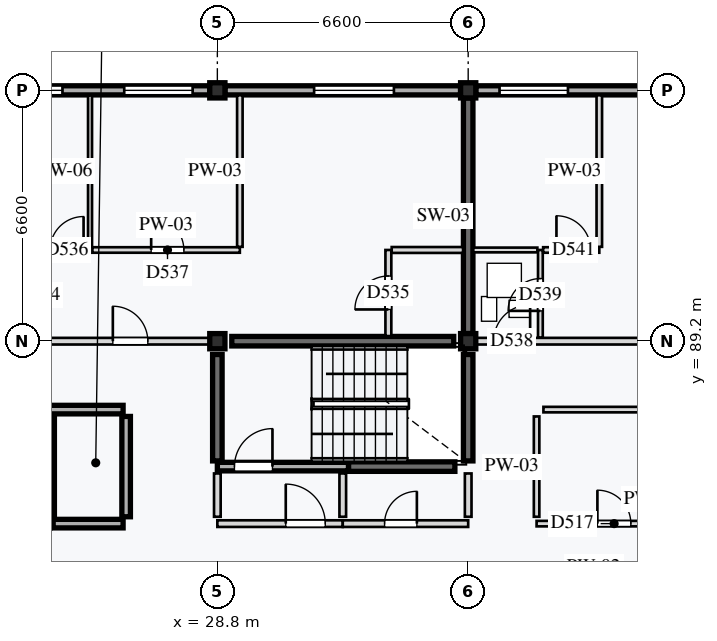
"""IFC4 building model, lengths in metres.
Left out: names, types, materials, properties, quantities, classifications, styles, units other than length and angle.
Written with IfcOpenShell. Run it as: python <this file> out.ifc"""

import sys

from ifc_helpers import new_model, si_unit, direction, frame, frame_2d, origin, origin_2d, place, context, subcontext, project, spatial, rectangle, extrude, element, fill, save


model = new_model("IFC4")
c1 = context("Model", 3, precision=1e-05, world=origin(), true_north=direction((0.0, 1.0)))
c2 = subcontext(c1, "Body", "Model", "MODEL_VIEW")
j1 = project(units=[si_unit("LENGTHUNIT", "METRE"), si_unit("PLANEANGLEUNIT", "RADIAN")], contexts=[c1])
p1 = place(None, origin())
s1 = spatial("IfcSite", under=j1, at=p1, CompositionType="ELEMENT")
p2 = place(p1, origin())
s2 = spatial("IfcBuilding", under=s1, at=p2, CompositionType="ELEMENT")
p3 = place(p2, frame((0.0, 0.0, 53.2)))
s3 = spatial("IfcBuildingStorey", under=s2, at=p3, CompositionType="ELEMENT", Elevation=53.2)
for number, where, z_axis, x_axis in (
    (1, (28.8, 89.2, 0.0), (0.0, 0.0, 1.0), (1.0, 0.0, 0.0)),
    (2, (28.8, 95.8, 0.0), (0.0, 0.0, 1.0), (1.0, 0.0, 0.0)),
    (3, (35.4, 89.2, 0.0), (0.0, 0.0, 1.0), (1.0, 0.0, 0.0)),
    (4, (35.4, 95.8, 0.0), (0.0, 0.0, 1.0), (1.0, 0.0, 0.0)),
):
    element("IfcColumn", number, at=place(p3, frame(where, z_axis=z_axis, x_axis=x_axis)), inside=s3, PredefinedType="COLUMN", context=c2, shape_type="SweptSolid", body=[
        extrude(rectangle(XDim=0.4, YDim=0.4, at=origin_2d()), origin(), (0.0, 0.0, 1.0), 3.2),
    ])
p4 = place(p3, frame((29.18, 89.2, 0.0), z_axis=(0.0, 0.0, 1.0), x_axis=(1.0, 0.0, 0.0)))
e5 = element("IfcWall", 5, at=p4, inside=s3, PredefinedType="SHEAR", context=c2, shape_type="SweptSolid", body=[
    extrude(rectangle(XDim=5.84, YDim=0.25, at=frame_2d((2.92, 0.0))), origin(), (0.0, 0.0, 1.0), 2.98),
])
for number, where, z_axis, x_axis in (
    (6, (32.25, 85.9, 0.0), (0.0, 0.0, 1.0), (1.0, 0.0, 0.0)),
    (7, (28.8, 86.05, 0.0), (0.0, 0.0, 1.0), (0.0, 1.0, 0.0)),
    (8, (35.4, 86.05, 0.0), (0.0, 0.0, 1.0), (0.0, 1.0, 0.0)),
):
    element("IfcWall", number, at=place(p3, frame(where, z_axis=z_axis, x_axis=x_axis)), inside=s3, PredefinedType="SHEAR", context=c2, shape_type="SweptSolid", body=[
        extrude(rectangle(XDim=2.8, YDim=0.25, at=frame_2d((1.4, 0.0))), origin(), (0.0, 0.0, 1.0), 2.98),
    ])
p5 = place(p3, frame((35.4, 89.4, 0.0), z_axis=(0.0, 0.0, 1.0), x_axis=(0.0, 1.0, 0.0)))
e9 = element("IfcWall", 9, at=p5, inside=s3, PredefinedType="SHEAR", context=c2, shape_type="SweptSolid", body=[
    extrude(rectangle(XDim=6.2, YDim=0.25, at=frame_2d((3.1, 0.0))), origin(), (0.0, 0.0, 1.0), 2.98),
])
p6 = place(p3, frame((22.4, 95.8, 0.0), z_axis=(0.0, 0.0, 1.0), x_axis=(1.0, 0.0, 0.0)))
e10 = element("IfcWall", 10, at=p6, inside=s3, PredefinedType="STANDARD", context=c2, shape_type="SweptSolid", body=[
    extrude(rectangle(XDim=6.2, YDim=0.24, at=frame_2d((3.1, 0.0))), origin(), (0.0, 0.0, 1.0), 2.6),
])
p7 = place(p6, frame((0.525, 0.0, 0.85)))
e11 = element("IfcOpeningElement", 11, at=p7, cuts=e10, PredefinedType="OPENING", context=c2, shape_type="SweptSolid", body=[
    extrude(rectangle(XDim=1.8, YDim=1.35, at=frame_2d((0.9, 0.675))), frame((0.0, 0.13, 0.0), z_axis=(0.0, -1.0, 0.0), x_axis=(1.0, 0.0, 0.0)), (0.0, 0.0, 1.0), 0.26),
])
p8 = place(p6, frame((3.95, 0.0, 0.85)))
e12 = element("IfcOpeningElement", 12, at=p8, cuts=e10, PredefinedType="OPENING", context=c2, shape_type="SweptSolid", body=[
    extrude(rectangle(XDim=1.8, YDim=1.35, at=frame_2d((0.9, 0.675))), frame((0.0, 0.13, 0.0), z_axis=(0.0, -1.0, 0.0), x_axis=(1.0, 0.0, 0.0)), (0.0, 0.0, 1.0), 0.26),
])
p9 = place(p3, frame((29.0, 95.8, 0.0), z_axis=(0.0, 0.0, 1.0), x_axis=(1.0, 0.0, 0.0)))
e13 = element("IfcWall", 13, at=p9, inside=s3, PredefinedType="STANDARD", context=c2, shape_type="SweptSolid", body=[
    extrude(rectangle(XDim=6.2, YDim=0.24, at=frame_2d((3.1, 0.0))), origin(), (0.0, 0.0, 1.0), 2.6),
])
p10 = place(p9, frame((2.346, 0.0, 0.85)))
e14 = element("IfcOpeningElement", 14, at=p10, cuts=e13, PredefinedType="OPENING", context=c2, shape_type="SweptSolid", body=[
    extrude(rectangle(XDim=2.1, YDim=1.55, at=frame_2d((1.05, 0.775))), frame((0.0, 0.13, 0.0), z_axis=(0.0, -1.0, 0.0), x_axis=(1.0, 0.0, 0.0)), (0.0, 0.0, 1.0), 0.26),
])
p11 = place(p3, frame((35.6, 95.8, 0.0), z_axis=(0.0, 0.0, 1.0), x_axis=(1.0, 0.0, 0.0)))
e15 = element("IfcWall", 15, at=p11, inside=s3, PredefinedType="STANDARD", context=c2, shape_type="SweptSolid", body=[
    extrude(rectangle(XDim=6.2, YDim=0.24, at=frame_2d((3.1, 0.0))), origin(), (0.0, 0.0, 1.0), 2.6),
])
p12 = place(p11, frame((0.625, 0.0, 0.85)))
e16 = element("IfcOpeningElement", 16, at=p12, cuts=e15, PredefinedType="OPENING", context=c2, shape_type="SweptSolid", body=[
    extrude(rectangle(XDim=1.8, YDim=1.35, at=frame_2d((0.9, 0.675))), frame((0.0, 0.13, 0.0), z_axis=(0.0, -1.0, 0.0), x_axis=(1.0, 0.0, 0.0)), (0.0, 0.0, 1.0), 0.26),
])
p13 = place(p3, frame((24.48, 84.4, 0.0), z_axis=(0.0, 0.0, 1.0), x_axis=(1.0, 0.0, 0.0)))
e17 = element("IfcWall", 17, at=p13, inside=s3, PredefinedType="STANDARD", context=c2, shape_type="SweptSolid", body=[
    extrude(rectangle(XDim=1.84, YDim=0.225, at=frame_2d((0.92, 0.0))), origin(), (0.0, 0.0, 1.0), 2.945),
])
p14 = place(p3, frame((22.298, 87.4, 0.0), z_axis=(0.0, 0.0, 1.0), x_axis=(1.0, 0.0, 0.0)))
e18 = element("IfcWall", 18, at=p14, inside=s3, PredefinedType="STANDARD", context=c2, shape_type="SweptSolid", body=[
    extrude(rectangle(XDim=4.022, YDim=0.225, at=frame_2d((2.011, 0.0))), origin(), (0.0, 0.0, 1.0), 2.945),
])
for number, where, z_axis, x_axis in (
    (19, (24.4, 84.58, 0.0), (0.0, 0.0, 1.0), (0.0, 1.0, 0.0)),
    (20, (26.4, 84.58, 0.0), (0.0, 0.0, 1.0), (0.0, 1.0, 0.0)),
):
    element("IfcWall", number, at=place(p3, frame(where, z_axis=z_axis, x_axis=x_axis)), inside=s3, PredefinedType="STANDARD", context=c2, shape_type="SweptSolid", body=[
        extrude(rectangle(XDim=2.64, YDim=0.225, at=frame_2d((1.32, 0.0))), origin(), (0.0, 0.0, 1.0), 2.945),
    ])
p15 = place(p3, frame((28.8, 85.9, 0.0), z_axis=(0.0, 0.0, 1.0), x_axis=(1.0, 0.0, 0.0)))
e21 = element("IfcWall", 21, at=p15, inside=s3, PredefinedType="STANDARD", context=c2, shape_type="SweptSolid", body=[
    extrude(rectangle(XDim=3.45, YDim=0.225, at=frame_2d((1.725, 0.0))), origin(), (0.0, 0.0, 1.0), 2.945),
])
p16 = place(p15, frame((0.45, 0.0, 0.0)))
e22 = element("IfcOpeningElement", 22, at=p16, cuts=e21, PredefinedType="OPENING", context=c2, shape_type="SweptSolid", body=[
    extrude(rectangle(XDim=1.0, YDim=2.16, at=frame_2d((0.5, 1.08))), frame((0.0, 0.123, 0.0), z_axis=(0.0, -1.0, 0.0), x_axis=(1.0, 0.0, 0.0)), (0.0, 0.0, 1.0), 0.245),
])
p17 = place(p3, frame((28.8, 84.4, 0.0), z_axis=(0.0, 0.0, 1.0), x_axis=(1.0, 0.0, 0.0)))
e23 = element("IfcWall", 23, at=p17, inside=s3, PredefinedType="PARTITIONING", context=c2, shape_type="SweptSolid", body=[
    extrude(rectangle(XDim=3.3, YDim=0.175, at=frame_2d((1.65, 0.0))), origin(), (0.0, 0.0, 1.0), 2.945),
])
p18 = place(p17, frame((1.8, 0.0, 0.0)))
e24 = element("IfcOpeningElement", 24, at=p18, cuts=e23, PredefinedType="OPENING", context=c2, shape_type="SweptSolid", body=[
    extrude(rectangle(XDim=1.04, YDim=2.12, at=frame_2d((0.52, 1.06))), frame((0.0, 0.097, 0.0), z_axis=(0.0, -1.0, 0.0), x_axis=(1.0, 0.0, 0.0)), (0.0, 0.0, 1.0), 0.195),
])
p19 = place(p3, frame((32.1, 84.4, 0.0), z_axis=(0.0, 0.0, 1.0), x_axis=(1.0, 0.0, 0.0)))
e25 = element("IfcWall", 25, at=p19, inside=s3, PredefinedType="PARTITIONING", context=c2, shape_type="SweptSolid", body=[
    extrude(rectangle(XDim=3.3, YDim=0.175, at=frame_2d((1.65, 0.0))), origin(), (0.0, 0.0, 1.0), 2.945),
])
p20 = place(p19, frame((1.1, 0.0, 0.0)))
e26 = element("IfcOpeningElement", 26, at=p20, cuts=e25, PredefinedType="OPENING", context=c2, shape_type="SweptSolid", body=[
    extrude(rectangle(XDim=0.85, YDim=2.0, at=frame_2d((0.425, 1.0))), frame((0.0, 0.097, 0.0), z_axis=(0.0, -1.0, 0.0), x_axis=(1.0, 0.0, 0.0)), (0.0, 0.0, 1.0), 0.195),
])
for number, where, z_axis, x_axis in (
    (27, (28.8, 84.58, 0.0), (0.0, 0.0, 1.0), (0.0, 1.0, 0.0)),
    (28, (32.1, 84.58, 0.0), (0.0, 0.0, 1.0), (0.0, 1.0, 0.0)),
    (29, (35.4, 84.58, 0.0), (0.0, 0.0, 1.0), (0.0, 1.0, 0.0)),
):
    element("IfcWall", number, at=place(p3, frame(where, z_axis=z_axis, x_axis=x_axis)), inside=s3, PredefinedType="PARTITIONING", context=c2, shape_type="SweptSolid", body=[
        extrude(rectangle(XDim=1.14, YDim=0.175, at=frame_2d((0.57, 0.0))), origin(), (0.0, 0.0, 1.0), 2.945),
    ])
p21 = place(p3, frame((37.2, 84.4, 0.0), z_axis=(0.0, 0.0, 1.0), x_axis=(1.0, 0.0, 0.0)))
e30 = element("IfcWall", 30, at=p21, inside=s3, PredefinedType="PARTITIONING", context=c2, shape_type="SweptSolid", body=[
    extrude(rectangle(XDim=6.0, YDim=0.145, at=frame_2d((3.0, 0.0))), origin(), (0.0, 0.0, 1.0), 2.945),
])
p22 = place(p21, frame((1.6, 0.0, 0.0)))
e31 = element("IfcOpeningElement", 31, at=p22, cuts=e30, PredefinedType="OPENING", context=c2, shape_type="SweptSolid", body=[
    extrude(rectangle(XDim=0.88, YDim=2.1, at=frame_2d((0.44, 1.05))), frame((0.0, 0.083, 0.0), z_axis=(0.0, -1.0, 0.0), x_axis=(1.0, 0.0, 0.0)), (0.0, 0.0, 1.0), 0.165),
])
p23 = place(p3, frame((37.38, 87.4, 0.0), z_axis=(0.0, 0.0, 1.0), x_axis=(1.0, 0.0, 0.0)))
e32 = element("IfcWall", 32, at=p23, inside=s3, PredefinedType="PARTITIONING", context=c2, shape_type="SweptSolid", body=[
    extrude(rectangle(XDim=11.2, YDim=0.145, at=frame_2d((5.6, 0.0))), origin(), (0.0, 0.0, 1.0), 2.945),
])
p24 = place(p3, frame((37.2, 84.58, 0.0), z_axis=(0.0, 0.0, 1.0), x_axis=(0.0, 1.0, 0.0)))
e33 = element("IfcWall", 33, at=p24, inside=s3, PredefinedType="PARTITIONING", context=c2, shape_type="SweptSolid", body=[
    extrude(rectangle(XDim=2.64, YDim=0.145, at=frame_2d((1.32, 0.0))), origin(), (0.0, 0.0, 1.0), 2.945),
])
p25 = place(p3, frame((22.2, 89.2, 0.0), z_axis=(0.0, 0.0, 1.0), x_axis=(1.0, 0.0, 0.0)))
e34 = element("IfcWall", 34, at=p25, inside=s3, PredefinedType="PARTITIONING", context=c2, shape_type="SweptSolid", body=[
    extrude(rectangle(XDim=6.6, YDim=0.175, at=frame_2d((3.3, 0.0))), origin(), (0.0, 0.0, 1.0), 2.7),
])
p26 = place(p25, frame((3.85, 0.0, 0.0)))
e35 = element("IfcOpeningElement", 35, at=p26, cuts=e34, PredefinedType="OPENING", context=c2, shape_type="SweptSolid", body=[
    extrude(rectangle(XDim=0.92, YDim=2.14, at=frame_2d((0.46, 1.07))), frame((0.0, 0.097, 0.0), z_axis=(0.0, -1.0, 0.0), x_axis=(1.0, 0.0, 0.0)), (0.0, 0.0, 1.0), 0.195),
])
p27 = place(p3, frame((33.3, 89.335, 0.0), z_axis=(0.0, 0.0, 1.0), x_axis=(0.0, 1.0, 0.0)))
e36 = element("IfcWall", 36, at=p27, inside=s3, PredefinedType="PARTITIONING", context=c2, shape_type="SweptSolid", body=[
    extrude(rectangle(XDim=2.265, YDim=0.155, at=frame_2d((1.133, 0.0))), origin(), (0.0, 0.0, 1.0), 2.945),
])
p28 = place(p27, frame((0.7, 0.0, 0.0)))
e37 = element("IfcOpeningElement", 37, at=p28, cuts=e36, PredefinedType="OPENING", context=c2, shape_type="SweptSolid", body=[
    extrude(rectangle(XDim=0.88, YDim=2.1, at=frame_2d((0.44, 1.05))), frame((0.0, 0.087, 0.0), z_axis=(0.0, -1.0, 0.0), x_axis=(1.0, 0.0, 0.0)), (0.0, 0.0, 1.0), 0.175),
])
p29 = place(p3, frame((33.387, 91.6, 0.0), z_axis=(0.0, 0.0, 1.0), x_axis=(1.0, 0.0, 0.0)))
e38 = element("IfcWall", 38, at=p29, inside=s3, PredefinedType="PARTITIONING", context=c2, shape_type="SweptSolid", body=[
    extrude(rectangle(XDim=1.877, YDim=0.155, at=frame_2d((0.939, 0.0))), origin(), (0.0, 0.0, 1.0), 2.945),
])
p30 = place(p3, frame((24.173, 91.6, 0.0), z_axis=(0.0, 0.0, 1.0), x_axis=(1.0, 0.0, 0.0)))
e39 = element("IfcWall", 39, at=p30, inside=s3, PredefinedType="PARTITIONING", context=c2, shape_type="SweptSolid", body=[
    extrude(rectangle(XDim=1.277, YDim=0.145, at=frame_2d((0.639, 0.0))), origin(), (0.0, 0.0, 1.0), 2.945),
])
p31 = place(p30, frame((0.228, 0.0, 0.0)))
e40 = element("IfcOpeningElement", 40, at=p31, cuts=e39, PredefinedType="OPENING", context=c2, shape_type="SweptSolid", body=[
    extrude(rectangle(XDim=0.88, YDim=2.16, at=frame_2d((0.44, 1.08))), frame((0.0, 0.083, 0.0), z_axis=(0.0, -1.0, 0.0), x_axis=(1.0, 0.0, 0.0)), (0.0, 0.0, 1.0), 0.165),
])
p32 = place(p3, frame((25.45, 91.683, 0.0), z_axis=(0.0, 0.0, 1.0), x_axis=(0.0, 1.0, 0.0)))
e41 = element("IfcWall", 41, at=p32, inside=s3, PredefinedType="PARTITIONING", context=c2, shape_type="SweptSolid", body=[
    extrude(rectangle(XDim=3.987, YDim=0.105, at=frame_2d((1.994, 0.0))), origin(), (0.0, 0.0, 1.0), 2.945),
])
p33 = place(p3, frame((25.512, 91.6, 0.0), z_axis=(0.0, 0.0, 1.0), x_axis=(1.0, 0.0, 0.0)))
e42 = element("IfcWall", 42, at=p33, inside=s3, PredefinedType="PARTITIONING", context=c2, shape_type="SweptSolid", body=[
    extrude(rectangle(XDim=3.88, YDim=0.145, at=frame_2d((1.94, 0.0))), origin(), (0.0, 0.0, 1.0), 2.945),
])
p34 = place(p33, frame((1.546, 0.0, 0.0)))
e43 = element("IfcOpeningElement", 43, at=p34, cuts=e42, PredefinedType="OPENING", context=c2, shape_type="SweptSolid", body=[
    extrude(rectangle(XDim=0.86, YDim=2.12, at=frame_2d((0.43, 1.06))), frame((0.0, 0.083, 0.0), z_axis=(0.0, -1.0, 0.0), x_axis=(1.0, 0.0, 0.0)), (0.0, 0.0, 1.0), 0.165),
])
p35 = place(p3, frame((29.392, 91.683, 0.0), z_axis=(0.0, 0.0, 1.0), x_axis=(0.0, 1.0, 0.0)))
e44 = element("IfcWall", 44, at=p35, inside=s3, PredefinedType="PARTITIONING", context=c2, shape_type="SweptSolid", body=[
    extrude(rectangle(XDim=3.987, YDim=0.145, at=frame_2d((1.994, 0.0))), origin(), (0.0, 0.0, 1.0), 2.945),
])
p36 = place(p3, frame((35.4, 89.2, 0.0), z_axis=(0.0, 0.0, 1.0), x_axis=(1.0, 0.0, 0.0)))
e45 = element("IfcWall", 45, at=p36, inside=s3, PredefinedType="PARTITIONING", context=c2, shape_type="SweptSolid", body=[
    extrude(rectangle(XDim=13.2, YDim=0.175, at=frame_2d((6.6, 0.0))), origin(), (0.0, 0.0, 1.0), 2.7),
])
p37 = place(p36, frame((0.67, 0.0, 0.0)))
e46 = element("IfcOpeningElement", 46, at=p37, cuts=e45, PredefinedType="OPENING", context=c2, shape_type="SweptSolid", body=[
    extrude(rectangle(XDim=0.96, YDim=2.18, at=frame_2d((0.48, 1.09))), frame((0.0, 0.097, 0.0), z_axis=(0.0, -1.0, 0.0), x_axis=(1.0, 0.0, 0.0)), (0.0, 0.0, 1.0), 0.195),
])
p38 = place(p3, frame((37.3, 89.298, 0.0), z_axis=(0.0, 0.0, 1.0), x_axis=(0.0, 1.0, 0.0)))
e47 = element("IfcWall", 47, at=p38, inside=s3, PredefinedType="PARTITIONING", context=c2, shape_type="SweptSolid", body=[
    extrude(rectangle(XDim=2.302, YDim=0.125, at=frame_2d((1.151, 0.0))), origin(), (0.0, 0.0, 1.0), 2.945),
])
p39 = place(p38, frame((0.7, 0.0, 0.0)))
e48 = element("IfcOpeningElement", 48, at=p39, cuts=e47, PredefinedType="OPENING", context=c2, shape_type="SweptSolid", body=[
    extrude(rectangle(XDim=0.85, YDim=2.04, at=frame_2d((0.425, 1.02))), frame((0.0, 0.073, 0.0), z_axis=(0.0, -1.0, 0.0), x_axis=(1.0, 0.0, 0.0)), (0.0, 0.0, 1.0), 0.145),
])
p40 = place(p3, frame((35.535, 91.6, 0.0), z_axis=(0.0, 0.0, 1.0), x_axis=(1.0, 0.0, 0.0)))
e49 = element("IfcWall", 49, at=p40, inside=s3, PredefinedType="PARTITIONING", context=c2, shape_type="SweptSolid", body=[
    extrude(rectangle(XDim=1.685, YDim=0.125, at=frame_2d((0.843, 0.0))), origin(), (0.0, 0.0, 1.0), 2.945),
])
p41 = place(p3, frame((37.373, 91.6, 0.0), z_axis=(0.0, 0.0, 1.0), x_axis=(1.0, 0.0, 0.0)))
e50 = element("IfcWall", 50, at=p41, inside=s3, PredefinedType="PARTITIONING", context=c2, shape_type="SweptSolid", body=[
    extrude(rectangle(XDim=1.478, YDim=0.145, at=frame_2d((0.739, 0.0))), origin(), (0.0, 0.0, 1.0), 2.945),
])
p42 = place(p41, frame((0.35, 0.0, 0.0)))
e51 = element("IfcOpeningElement", 51, at=p42, cuts=e50, PredefinedType="OPENING", context=c2, shape_type="SweptSolid", body=[
    extrude(rectangle(XDim=0.9, YDim=2.1, at=frame_2d((0.45, 1.05))), frame((0.0, 0.083, 0.0), z_axis=(0.0, -1.0, 0.0), x_axis=(1.0, 0.0, 0.0)), (0.0, 0.0, 1.0), 0.165),
])
p43 = place(p3, frame((38.85, 91.683, 0.0), z_axis=(0.0, 0.0, 1.0), x_axis=(0.0, 1.0, 0.0)))
e52 = element("IfcWall", 52, at=p43, inside=s3, PredefinedType="PARTITIONING", context=c2, shape_type="SweptSolid", body=[
    extrude(rectangle(XDim=3.987, YDim=0.145, at=frame_2d((1.994, 0.0))), origin(), (0.0, 0.0, 1.0), 2.945),
])
p44 = place(p7, origin())
e53 = element("IfcWindow", 53, at=p44, inside=s3, PartitioningType="SINGLE_PANEL", PredefinedType="WINDOW", context=c2, shape_type="SweptSolid", body=[
    extrude(rectangle(XDim=1.8, YDim=1.35, at=frame_2d((0.9, 0.675))), frame((0.0, 0.03, 0.0), z_axis=(0.0, -1.0, 0.0), x_axis=(1.0, 0.0, 0.0)), (0.0, 0.0, 1.0), 0.06),
])
fill(e11, e53)
p45 = place(p8, origin())
e54 = element("IfcWindow", 54, at=p45, inside=s3, PartitioningType="SINGLE_PANEL", PredefinedType="WINDOW", context=c2, shape_type="SweptSolid", body=[
    extrude(rectangle(XDim=1.8, YDim=1.35, at=frame_2d((0.9, 0.675))), frame((0.0, 0.03, 0.0), z_axis=(0.0, -1.0, 0.0), x_axis=(1.0, 0.0, 0.0)), (0.0, 0.0, 1.0), 0.06),
])
fill(e12, e54)
p46 = place(p10, origin())
e55 = element("IfcWindow", 55, at=p46, inside=s3, PartitioningType="SINGLE_PANEL", PredefinedType="WINDOW", context=c2, shape_type="SweptSolid", body=[
    extrude(rectangle(XDim=2.1, YDim=1.55, at=frame_2d((1.05, 0.775))), frame((0.0, 0.03, 0.0), z_axis=(0.0, -1.0, 0.0), x_axis=(1.0, 0.0, 0.0)), (0.0, 0.0, 1.0), 0.06),
])
fill(e14, e55)
p47 = place(p12, origin())
e56 = element("IfcWindow", 56, at=p47, inside=s3, PartitioningType="SINGLE_PANEL", PredefinedType="WINDOW", context=c2, shape_type="SweptSolid", body=[
    extrude(rectangle(XDim=1.8, YDim=1.35, at=frame_2d((0.9, 0.675))), frame((0.0, 0.03, 0.0), z_axis=(0.0, -1.0, 0.0), x_axis=(1.0, 0.0, 0.0)), (0.0, 0.0, 1.0), 0.06),
])
fill(e16, e56)
p48 = place(p16, origin())
e57 = element("IfcDoor", 57, at=p48, inside=s3, OperationType="SINGLE_SWING_RIGHT", PredefinedType="DOOR", context=c2, shape_type="SweptSolid", body=[
    extrude(rectangle(XDim=1.0, YDim=2.16, at=frame_2d((0.5, 1.08))), frame((0.0, 0.025, 0.0), z_axis=(0.0, -1.0, 0.0), x_axis=(1.0, 0.0, 0.0)), (0.0, 0.0, 1.0), 0.05),
])
fill(e22, e57)
p49 = place(p18, origin())
e58 = element("IfcDoor", 58, at=p49, inside=s3, OperationType="SINGLE_SWING_LEFT", PredefinedType="DOOR", context=c2, shape_type="SweptSolid", body=[
    extrude(rectangle(XDim=1.04, YDim=2.12, at=frame_2d((0.52, 1.06))), frame((0.0, 0.025, 0.0), z_axis=(0.0, -1.0, 0.0), x_axis=(1.0, 0.0, 0.0)), (0.0, 0.0, 1.0), 0.05),
])
fill(e24, e58)
p50 = place(p20, origin())
e59 = element("IfcDoor", 59, at=p50, inside=s3, OperationType="SINGLE_SWING_RIGHT", PredefinedType="DOOR", context=c2, shape_type="SweptSolid", body=[
    extrude(rectangle(XDim=0.85, YDim=2.0, at=frame_2d((0.425, 1.0))), frame((0.0, 0.025, 0.0), z_axis=(0.0, -1.0, 0.0), x_axis=(1.0, 0.0, 0.0)), (0.0, 0.0, 1.0), 0.05),
])
fill(e26, e59)
p51 = place(p22, origin())
e60 = element("IfcDoor", 60, at=p51, inside=s3, OperationType="SINGLE_SWING_LEFT", PredefinedType="DOOR", context=c2, shape_type="SweptSolid", body=[
    extrude(rectangle(XDim=0.88, YDim=2.1, at=frame_2d((0.44, 1.05))), frame((0.0, 0.025, 0.0), z_axis=(0.0, -1.0, 0.0), x_axis=(1.0, 0.0, 0.0)), (0.0, 0.0, 1.0), 0.05),
])
fill(e31, e60)
p52 = place(p26, origin())
e61 = element("IfcDoor", 61, at=p52, inside=s3, OperationType="SINGLE_SWING_LEFT", PredefinedType="DOOR", context=c2, shape_type="SweptSolid", body=[
    extrude(rectangle(XDim=0.92, YDim=2.14, at=frame_2d((0.46, 1.07))), frame((0.0, 0.025, 0.0), z_axis=(0.0, -1.0, 0.0), x_axis=(1.0, 0.0, 0.0)), (0.0, 0.0, 1.0), 0.05),
])
fill(e35, e61)
p53 = place(p28, origin())
e62 = element("IfcDoor", 62, at=p53, inside=s3, OperationType="SINGLE_SWING_LEFT", PredefinedType="DOOR", context=c2, shape_type="SweptSolid", body=[
    extrude(rectangle(XDim=0.88, YDim=2.1, at=frame_2d((0.44, 1.05))), frame((0.0, 0.025, 0.0), z_axis=(0.0, -1.0, 0.0), x_axis=(1.0, 0.0, 0.0)), (0.0, 0.0, 1.0), 0.05),
])
fill(e37, e62)
p54 = place(p31, origin())
e63 = element("IfcDoor", 63, at=p54, inside=s3, OperationType="SINGLE_SWING_RIGHT", PredefinedType="DOOR", context=c2, shape_type="SweptSolid", body=[
    extrude(rectangle(XDim=0.88, YDim=2.16, at=frame_2d((0.44, 1.08))), frame((0.0, 0.025, 0.0), z_axis=(0.0, -1.0, 0.0), x_axis=(1.0, 0.0, 0.0)), (0.0, 0.0, 1.0), 0.05),
])
fill(e40, e63)
p55 = place(p34, origin())
e64 = element("IfcDoor", 64, at=p55, inside=s3, OperationType="SINGLE_SWING_LEFT", PredefinedType="DOOR", context=c2, shape_type="SweptSolid", body=[
    extrude(rectangle(XDim=0.86, YDim=2.12, at=frame_2d((0.43, 1.06))), frame((0.0, 0.025, 0.0), z_axis=(0.0, -1.0, 0.0), x_axis=(1.0, 0.0, 0.0)), (0.0, 0.0, 1.0), 0.05),
])
fill(e43, e64)
p56 = place(p37, origin())
e65 = element("IfcDoor", 65, at=p56, inside=s3, OperationType="SINGLE_SWING_RIGHT", PredefinedType="DOOR", context=c2, shape_type="SweptSolid", body=[
    extrude(rectangle(XDim=0.96, YDim=2.18, at=frame_2d((0.48, 1.09))), frame((0.0, 0.025, 0.0), z_axis=(0.0, -1.0, 0.0), x_axis=(1.0, 0.0, 0.0)), (0.0, 0.0, 1.0), 0.05),
])
fill(e46, e65)
p57 = place(p39, origin())
e66 = element("IfcDoor", 66, at=p57, inside=s3, OperationType="SINGLE_SWING_LEFT", PredefinedType="DOOR", context=c2, shape_type="SweptSolid", body=[
    extrude(rectangle(XDim=0.85, YDim=2.04, at=frame_2d((0.425, 1.02))), frame((0.0, 0.025, 0.0), z_axis=(0.0, -1.0, 0.0), x_axis=(1.0, 0.0, 0.0)), (0.0, 0.0, 1.0), 0.05),
])
fill(e48, e66)
p58 = place(p42, origin())
e67 = element("IfcDoor", 67, at=p58, inside=s3, OperationType="SINGLE_SWING_LEFT", PredefinedType="DOOR", context=c2, shape_type="SweptSolid", body=[
    extrude(rectangle(XDim=0.9, YDim=2.1, at=frame_2d((0.45, 1.05))), frame((0.0, 0.025, 0.0), z_axis=(0.0, -1.0, 0.0), x_axis=(1.0, 0.0, 0.0)), (0.0, 0.0, 1.0), 0.05),
])
fill(e51, e67)
save(model, sys.argv[1])
